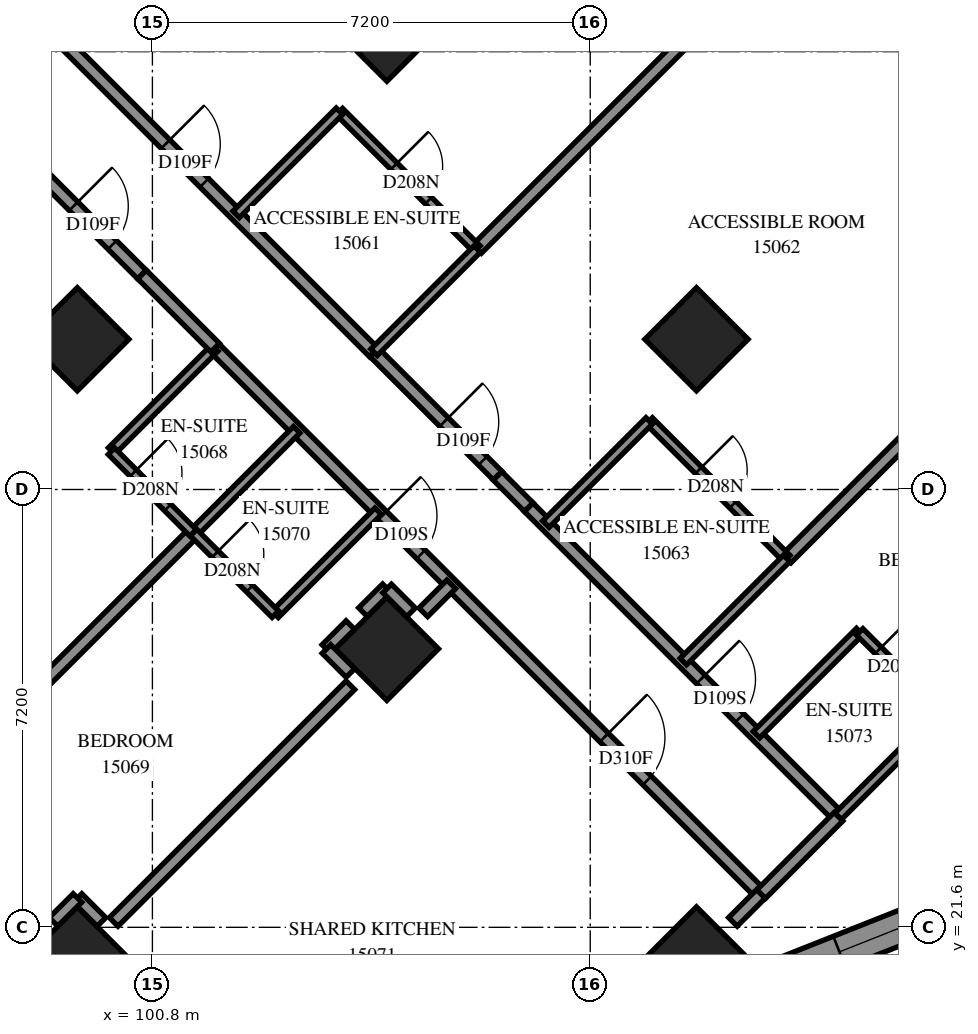
"""IFC4 building model, lengths in metres.
Left out: names, types, materials, properties, quantities, classifications, styles, units other than length and angle.
Written with IfcOpenShell. Run it as: python <this file> out.ifc"""

import sys

from ifc_helpers import new_model, si_unit, direction, frame, frame_2d, origin, origin_2d, place, context, subcontext, project, spatial, polyline, rectangle, outline, extrude, element, fill, save


model = new_model("IFC4")
c1 = context("Model", 3, precision=1e-05, world=origin(), true_north=direction((0.0, 1.0)))
c2 = subcontext(c1, "Body", "Model", "MODEL_VIEW")
j1 = project(units=[si_unit("LENGTHUNIT", "METRE"), si_unit("PLANEANGLEUNIT", "RADIAN")], contexts=[c1])
p1 = place(None, origin())
s1 = spatial("IfcSite", under=j1, at=p1, CompositionType="ELEMENT")
p2 = place(p1, origin())
s2 = spatial("IfcBuilding", under=s1, at=p2, CompositionType="ELEMENT")
p3 = place(p2, frame((0.0, 0.0, 57.6)))
s3 = spatial("IfcBuildingStorey", under=s2, at=p3, CompositionType="ELEMENT", Elevation=57.6)
for number, where, z_axis, x_axis in (
    (1, (104.656, 36.362, 0.0), (0.0, 0.0, 1.0), (0.707, -0.707, 0.0)),
    (2, (99.565, 31.271, 0.0), (0.0, 0.0, 1.0), (0.707, -0.707, 0.0)),
    (3, (109.747, 31.271, 0.0), (0.0, 0.0, 1.0), (0.707, -0.707, 0.0)),
    (4, (104.656, 26.18, 0.0), (0.0, 0.0, 1.0), (0.707, -0.707, 0.0)),
    (5, (99.565, 21.088, 0.0), (0.0, 0.0, 1.0), (0.707, -0.707, 0.0)),
    (6, (109.747, 21.088, 0.0), (0.0, 0.0, 1.0), (0.707, -0.707, 0.0)),
):
    element("IfcColumn", number, at=place(p3, frame(where, z_axis=z_axis, x_axis=x_axis)), inside=s3, PredefinedType="COLUMN", context=c2, shape_type="SweptSolid", body=[
        extrude(rectangle(XDim=1.2, YDim=1.2, at=origin_2d()), origin(), (0.0, 0.0, 1.0), 3.1),
    ])
p4 = place(p3, frame((110.959, 20.744, 0.0), z_axis=(0.0, 0.0, 1.0), x_axis=(0.929534299, 0.36873566, 0.0)))
e7 = element("IfcWall", 7, at=p4, inside=s3, PredefinedType="SOLIDWALL", context=c2, shape_type="SweptSolid", body=[
    extrude(outline(polyline([(0.119, -0.275), (5.667, -0.275), (5.418, 0.275), (-0.119, 0.275), (0.119, -0.275)])), origin(), (0.0, 0.0, 1.0), 3.1),
])
p5 = place(p4, frame((1.226, 0.0, 0.5)))
e8 = element("IfcOpeningElement", 8, at=p5, cuts=e7, PredefinedType="OPENING", context=c2, shape_type="SweptSolid", body=[
    extrude(rectangle(XDim=2.8, YDim=2.45, at=frame_2d((1.4, 1.225))), frame((0.0, 0.285, 0.0), z_axis=(0.0, -1.0, 0.0), x_axis=(1.0, 0.0, 0.0)), (0.0, 0.0, 1.0), 0.57),
])
p6 = place(p3, frame((96.645, 22.704, 0.0), z_axis=(0.0, 0.0, 1.0), x_axis=(0.5960735241, -0.8029298561, 0.0)))
e9 = element("IfcWall", 9, at=p6, inside=s3, PredefinedType="SOLIDWALL", context=c2, shape_type="SweptSolid", body=[
    extrude(outline(polyline([(0.041, -0.275), (3.951, -0.275), (3.87, 0.275), (-0.041, 0.275), (0.041, -0.275)])), origin(), (0.0, 0.0, 1.0), 3.1),
])
p7 = place(p6, frame((0.456, 0.0, 0.7)))
e10 = element("IfcOpeningElement", 10, at=p7, cuts=e9, PredefinedType="OPENING", context=c2, shape_type="SweptSolid", body=[
    extrude(rectangle(XDim=1.8, YDim=2.2, at=frame_2d((0.9, 1.1))), frame((0.0, 0.285, 0.0), z_axis=(0.0, -1.0, 0.0), x_axis=(1.0, 0.0, 0.0)), (0.0, 0.0, 1.0), 0.57),
])
p8 = place(p3, frame((101.825, 31.125, 0.0), z_axis=(0.0, 0.0, 1.0), x_axis=(0.7071067812, -0.7071067812, 0.0)))
e11 = element("IfcWall", 11, at=p8, inside=s3, PredefinedType="PARTITIONING", context=c2, shape_type="SweptSolid", body=[
    extrude(rectangle(XDim=12.7, YDim=0.2, at=frame_2d((6.35, 0.0))), origin(), (0.0, 0.0, 1.0), 3.1),
])
p9 = place(p8, frame((3.895, 0.0, 0.0)))
e12 = element("IfcOpeningElement", 12, at=p9, cuts=e11, PredefinedType="OPENING", context=c2, shape_type="SweptSolid", body=[
    extrude(rectangle(XDim=0.9, YDim=2.1, at=frame_2d((0.45, 1.05))), frame((0.0, 0.11, 0.0), z_axis=(0.0, -1.0, 0.0), x_axis=(1.0, 0.0, 0.0)), (0.0, 0.0, 1.0), 0.22),
])
p10 = place(p8, frame((9.056, 0.0, 0.0)))
e13 = element("IfcOpeningElement", 13, at=p10, cuts=e11, PredefinedType="OPENING", context=c2, shape_type="SweptSolid", body=[
    extrude(rectangle(XDim=1.0, YDim=2.1, at=frame_2d((0.5, 1.05))), frame((0.0, 0.11, 0.0), z_axis=(0.0, -1.0, 0.0), x_axis=(1.0, 0.0, 0.0)), (0.0, 0.0, 1.0), 0.22),
])
p11 = place(p3, frame((106.14, 32.756, 0.0), z_axis=(0.0, 0.0, 1.0), x_axis=(0.7071067812, 0.7071067812, 0.0)))
e14 = element("IfcWall", 14, at=p11, inside=s3, PredefinedType="PARTITIONING", context=c2, shape_type="SweptSolid", body=[
    extrude(rectangle(XDim=9.86, YDim=0.2, at=frame_2d((4.93, 0.0))), origin(), (0.0, 0.0, 1.0), 3.1),
])
p12 = place(p3, frame((99.349, 36.147, 0.0), z_axis=(0.0, 0.0, 1.0), x_axis=(0.7071067812, -0.7071067812, 0.0)))
e15 = element("IfcWall", 15, at=p12, inside=s3, PredefinedType="PARTITIONING", context=c2, shape_type="SweptSolid", body=[
    extrude(rectangle(XDim=7.201, YDim=0.2, at=frame_2d((3.601, 0.0))), origin(), (0.0, 0.0, 1.0), 3.1),
])
p13 = place(p12, frame((2.358, 0.0, 0.0)))
e16 = element("IfcOpeningElement", 16, at=p13, cuts=e15, PredefinedType="OPENING", context=c2, shape_type="SweptSolid", body=[
    extrude(rectangle(XDim=0.9, YDim=2.1, at=frame_2d((0.45, 1.05))), frame((0.0, 0.11, 0.0), z_axis=(0.0, -1.0, 0.0), x_axis=(1.0, 0.0, 0.0)), (0.0, 0.0, 1.0), 0.22),
])
p14 = place(p3, frame((106.987, 28.509, 0.0), z_axis=(0.0, 0.0, 1.0), x_axis=(0.7071067812, -0.7071067812, 0.0)))
e17 = element("IfcWall", 17, at=p14, inside=s3, PredefinedType="PARTITIONING", context=c2, shape_type="SweptSolid", body=[
    extrude(rectangle(XDim=7.198, YDim=0.2, at=frame_2d((3.599, 0.0))), origin(), (0.0, 0.0, 1.0), 3.1),
])
p15 = place(p14, frame((4.004, 0.0, 0.0)))
e18 = element("IfcOpeningElement", 18, at=p15, cuts=e17, PredefinedType="OPENING", context=c2, shape_type="SweptSolid", body=[
    extrude(rectangle(XDim=0.9, YDim=2.1, at=frame_2d((0.45, 1.05))), frame((0.0, 0.11, 0.0), z_axis=(0.0, -1.0, 0.0), x_axis=(1.0, 0.0, 0.0)), (0.0, 0.0, 1.0), 0.22),
])
p16 = place(p3, frame((96.522, 23.138, 0.0), z_axis=(0.0, 0.0, 1.0), x_axis=(0.707113922, 0.7070996403, 0.0)))
e19 = element("IfcWall", 19, at=p16, inside=s3, PredefinedType="PARTITIONING", context=c2, shape_type="SweptSolid", body=[
    extrude(rectangle(XDim=7.002, YDim=0.2, at=frame_2d((3.501, 0.0))), origin(), (0.0, 0.0, 1.0), 3.1),
])
p17 = place(p3, frame((100.163, 21.689, 0.0), z_axis=(0.0, 0.0, 1.0), x_axis=(0.7071067812, 0.7071067812, 0.0)))
e20 = element("IfcWall", 20, at=p17, inside=s3, PredefinedType="PARTITIONING", context=c2, shape_type="SweptSolid", body=[
    extrude(rectangle(XDim=5.504, YDim=0.2, at=frame_2d((2.752, 0.0))), origin(), (0.0, 0.0, 1.0), 3.1),
])
p18 = place(p3, frame((111.231, 27.665, 0.0), z_axis=(0.0, 0.0, 1.0), x_axis=(0.7071067812, 0.7071067812, 0.0)))
e21 = element("IfcWall", 21, at=p18, inside=s3, PredefinedType="PARTITIONING", context=c2, shape_type="SweptSolid", body=[
    extrude(rectangle(XDim=4.55, YDim=0.2, at=frame_2d((2.275, 0.0))), origin(), (0.0, 0.0, 1.0), 3.1),
])
p19 = place(p3, frame((98.082, 34.879, 0.0), z_axis=(0.0, 0.0, 1.0), x_axis=(0.7073845681, -0.7068288851, 0.0)))
e22 = element("IfcWall", 22, at=p19, inside=s3, PredefinedType="PARTITIONING", context=c2, shape_type="SweptSolid", body=[
    extrude(rectangle(XDim=3.599, YDim=0.2, at=frame_2d((1.8, 0.0))), origin(), (0.0, 0.0, 1.0), 3.1),
])
p20 = place(p19, frame((2.009, 0.0, 0.0)))
e23 = element("IfcOpeningElement", 23, at=p20, cuts=e22, PredefinedType="OPENING", context=c2, shape_type="SweptSolid", body=[
    extrude(rectangle(XDim=0.9, YDim=2.1, at=frame_2d((0.45, 1.05))), frame((0.0, 0.11, 0.0), z_axis=(0.0, -1.0, 0.0), x_axis=(1.0, 0.0, 0.0)), (0.0, 0.0, 1.0), 0.22),
])
p21 = place(p3, frame((108.97, 29.928, 0.0), z_axis=(0.0, 0.0, 1.0), x_axis=(0.7067942478, -0.7074191764, 0.0)))
e24 = element("IfcWall", 24, at=p21, inside=s3, PredefinedType="PARTITIONING", context=c2, shape_type="SweptSolid", body=[
    extrude(rectangle(XDim=3.2, YDim=0.15, at=frame_2d((1.6, 0.0))), origin(), (0.0, 0.0, 1.0), 3.1),
])
p22 = place(p21, frame((1.148, 0.0, 0.0)))
e25 = element("IfcOpeningElement", 25, at=p22, cuts=e24, PredefinedType="OPENING", context=c2, shape_type="SweptSolid", body=[
    extrude(rectangle(XDim=0.8, YDim=2.1, at=frame_2d((0.4, 1.05))), frame((0.0, 0.085, 0.0), z_axis=(0.0, -1.0, 0.0), x_axis=(1.0, 0.0, 0.0)), (0.0, 0.0, 1.0), 0.17),
])
p23 = place(p3, frame((103.875, 35.015, 0.0), z_axis=(0.0, 0.0, 1.0), x_axis=(0.7071067812, -0.7071067812, 0.0)))
e26 = element("IfcWall", 26, at=p23, inside=s3, PredefinedType="PARTITIONING", context=c2, shape_type="SweptSolid", body=[
    extrude(rectangle(XDim=3.199, YDim=0.15, at=frame_2d((1.599, 0.0))), origin(), (0.0, 0.0, 1.0), 3.1),
])
p24 = place(p23, frame((1.27, 0.0, 0.0)))
e27 = element("IfcOpeningElement", 27, at=p24, cuts=e26, PredefinedType="OPENING", context=c2, shape_type="SweptSolid", body=[
    extrude(rectangle(XDim=0.8, YDim=2.1, at=frame_2d((0.4, 1.05))), frame((0.0, 0.085, 0.0), z_axis=(0.0, -1.0, 0.0), x_axis=(1.0, 0.0, 0.0)), (0.0, 0.0, 1.0), 0.17),
])
p25 = place(p3, frame((104.445, 31.059, 0.0), z_axis=(0.0, 0.0, 1.0), x_axis=(0.7074545101, -0.7067588812, 0.0)))
e28 = element("IfcWall", 28, at=p25, inside=s3, PredefinedType="PARTITIONING", context=c2, shape_type="SweptSolid", body=[
    extrude(rectangle(XDim=2.875, YDim=0.2, at=frame_2d((1.438, 0.0))), origin(), (0.0, 0.0, 1.0), 3.1),
])
p26 = place(p25, frame((1.626, 0.0, 0.0)))
e29 = element("IfcOpeningElement", 29, at=p26, cuts=e28, PredefinedType="OPENING", context=c2, shape_type="SweptSolid", body=[
    extrude(rectangle(XDim=0.9, YDim=2.1, at=frame_2d((0.45, 1.05))), frame((0.0, 0.11, 0.0), z_axis=(0.0, -1.0, 0.0), x_axis=(1.0, 0.0, 0.0)), (0.0, 0.0, 1.0), 0.22),
])
for number, where, z_axis, x_axis in (
    (30, (107.271, 28.231, 0.0), (0.0, 0.0, 1.0), (0.707, 0.707, 0.0)),
    (31, (100.129, 29.433, 0.0), (0.0, 0.0, 1.0), (0.707, 0.707, 0.0)),
):
    element("IfcWall", number, at=place(p3, frame(where, z_axis=z_axis, x_axis=x_axis)), inside=s3, PredefinedType="PARTITIONING", context=c2, shape_type="SweptSolid", body=[
        extrude(rectangle(XDim=2.401, YDim=0.15, at=frame_2d((1.201, 0.0))), origin(), (0.0, 0.0, 1.0), 3.1),
    ])
p27 = place(p3, frame((104.445, 31.057, 0.0), z_axis=(0.0, 0.0, 1.0), x_axis=(0.706689978, 0.7075233388, 0.0)))
e32 = element("IfcWall", 32, at=p27, inside=s3, PredefinedType="PARTITIONING", context=c2, shape_type="SweptSolid", body=[
    extrude(rectangle(XDim=2.4, YDim=0.15, at=frame_2d((1.2, 0.0))), origin(), (0.0, 0.0, 1.0), 3.1),
])
p28 = place(p3, frame((112.077, 23.425, 0.0), z_axis=(0.0, 0.0, 1.0), x_axis=(0.7075233388, 0.706689978, 0.0)))
e33 = element("IfcWall", 33, at=p28, inside=s3, PredefinedType="PARTITIONING", context=c2, shape_type="SweptSolid", body=[
    extrude(rectangle(XDim=2.4, YDim=0.15, at=frame_2d((1.2, 0.0))), origin(), (0.0, 0.0, 1.0), 2.6),
])
for number, where, z_axis, x_axis in (
    (34, (101.477, 28.085, 0.0), (0.0, 0.0, 1.0), (0.707, 0.708, 0.0)),
    (35, (102.177, 33.325, 0.0), (0.0, 0.0, 1.0), (0.708, 0.707, 0.0)),
    (36, (109.531, 25.971, 0.0), (0.0, 0.0, 1.0), (0.708, 0.707, 0.0)),
    (37, (110.734, 24.768, 0.0), (0.0, 0.0, 1.0), (0.708, 0.707, 0.0)),
):
    element("IfcWall", number, at=place(p3, frame(where, z_axis=z_axis, x_axis=x_axis)), inside=s3, PredefinedType="PARTITIONING", context=c2, shape_type="SweptSolid", body=[
        extrude(rectangle(XDim=2.4, YDim=0.15, at=frame_2d((1.2, 0.0))), origin(), (0.0, 0.0, 1.0), 3.1),
    ])
p29 = place(p3, frame((102.817, 26.747, 0.0), z_axis=(0.0, 0.0, 1.0), x_axis=(0.7071067812, 0.7071067812, 0.0)))
e38 = element("IfcWall", 38, at=p29, inside=s3, PredefinedType="PARTITIONING", context=c2, shape_type="SweptSolid", body=[
    extrude(rectangle(XDim=2.398, YDim=0.15, at=frame_2d((1.199, 0.0))), origin(), (0.0, 0.0, 1.0), 3.1),
])
p30 = place(p3, frame((100.127, 29.429, 0.0), z_axis=(0.0, 0.0, 1.0), x_axis=(0.7071067812, -0.7071067812, 0.0)))
e39 = element("IfcWall", 39, at=p30, inside=s3, PredefinedType="PARTITIONING", context=c2, shape_type="SweptSolid", body=[
    extrude(rectangle(XDim=1.901, YDim=0.15, at=frame_2d((0.95, 0.0))), origin(), (0.0, 0.0, 1.0), 3.1),
])
p31 = place(p30, frame((0.508, 0.0, 0.0)))
e40 = element("IfcOpeningElement", 40, at=p31, cuts=e39, PredefinedType="OPENING", context=c2, shape_type="SweptSolid", body=[
    extrude(rectangle(XDim=0.8, YDim=2.1, at=frame_2d((0.4, 1.05))), frame((0.0, 0.085, 0.0), z_axis=(0.0, -1.0, 0.0), x_axis=(1.0, 0.0, 0.0)), (0.0, 0.0, 1.0), 0.17),
])
p32 = place(p3, frame((112.431, 26.459, 0.0), z_axis=(0.0, 0.0, 1.0), x_axis=(0.7071067812, -0.7071067812, 0.0)))
e41 = element("IfcWall", 41, at=p32, inside=s3, PredefinedType="PARTITIONING", context=c2, shape_type="SweptSolid", body=[
    extrude(rectangle(XDim=1.901, YDim=0.15, at=frame_2d((0.95, 0.0))), origin(), (0.0, 0.0, 1.0), 3.1),
])
p33 = place(p32, frame((0.431, 0.0, 0.0)))
e42 = element("IfcOpeningElement", 42, at=p33, cuts=e41, PredefinedType="OPENING", context=c2, shape_type="SweptSolid", body=[
    extrude(rectangle(XDim=0.8, YDim=2.1, at=frame_2d((0.4, 1.05))), frame((0.0, 0.085, 0.0), z_axis=(0.0, -1.0, 0.0), x_axis=(1.0, 0.0, 0.0)), (0.0, 0.0, 1.0), 0.17),
])
p34 = place(p3, frame((101.477, 28.091, 0.0), z_axis=(0.0, 0.0, 1.0), x_axis=(0.7076330979, -0.7065800724, 0.0)))
e43 = element("IfcWall", 43, at=p34, inside=s3, PredefinedType="PARTITIONING", context=c2, shape_type="SweptSolid", body=[
    extrude(rectangle(XDim=1.899, YDim=0.15, at=frame_2d((0.95, 0.0))), origin(), (0.0, 0.0, 1.0), 3.1),
])
p35 = place(p34, frame((0.501, 0.0, 0.0)))
e44 = element("IfcOpeningElement", 44, at=p35, cuts=e43, PredefinedType="OPENING", context=c2, shape_type="SweptSolid", body=[
    extrude(rectangle(XDim=0.8, YDim=2.1, at=frame_2d((0.4, 1.05))), frame((0.0, 0.085, 0.0), z_axis=(0.0, -1.0, 0.0), x_axis=(1.0, 0.0, 0.0)), (0.0, 0.0, 1.0), 0.17),
])
p36 = place(p3, frame((110.811, 22.145, 0.0), z_axis=(0.0, 0.0, 1.0), x_axis=(0.7065510983, 0.7076620277, 0.0)))
e45 = element("IfcWall", 45, at=p36, inside=s3, PredefinedType="PARTITIONING", context=c2, shape_type="SweptSolid", body=[
    extrude(rectangle(XDim=1.8, YDim=0.2, at=frame_2d((0.9, 0.0))), origin(), (0.0, 0.0, 1.0), 2.6),
])
p37 = place(p3, frame((100.629, 32.335, 0.0), z_axis=(0.0, 0.0, 1.0), x_axis=(0.7071067812, -0.7071067812, 0.0)))
e46 = element("IfcWall", 46, at=p37, inside=s3, PredefinedType="PARTITIONING", context=c2, shape_type="SweptSolid", body=[
    extrude(rectangle(XDim=1.7, YDim=0.2, at=frame_2d((0.85, 0.0))), origin(), (0.0, 0.0, 1.0), 3.1),
])
p38 = place(p3, frame((106.476, 29.024, 0.0), z_axis=(0.0, 0.0, 1.0), x_axis=(0.7057270646, -0.7084838109, 0.0)))
e47 = element("IfcWall", 47, at=p38, inside=s3, PredefinedType="PARTITIONING", context=c2, shape_type="SweptSolid", body=[
    extrude(rectangle(XDim=0.726, YDim=0.2, at=frame_2d((0.363, 0.0))), origin(), (0.0, 0.0, 1.0), 3.1),
])
p39 = place(p3, frame((110.347, 21.689, 0.0), z_axis=(0.0, 0.0, 1.0), x_axis=(0.7071067812, 0.7071067812, 0.0)))
e48 = element("IfcWall", 48, at=p39, inside=s3, PredefinedType="PARTITIONING", context=c2, shape_type="SweptSolid", body=[
    extrude(rectangle(XDim=0.65, YDim=0.2, at=frame_2d((0.325, 0.0))), origin(), (0.0, 0.0, 1.0), 2.6),
])
p40 = place(p3, frame((105.255, 26.781, 0.0), z_axis=(0.0, 0.0, 1.0), x_axis=(0.7071067812, 0.7071067812, 0.0)))
e49 = element("IfcWall", 49, at=p40, inside=s3, PredefinedType="PARTITIONING", context=c2, shape_type="SweptSolid", body=[
    extrude(rectangle(XDim=0.65, YDim=0.2, at=frame_2d((0.325, 0.0))), origin(), (0.0, 0.0, 1.0), 3.1),
])
for number, where, z_axis, x_axis in (
    (50, (99.568, 22.082, 0.0), (0.0, 0.0, 1.0), (0.707, -0.707, 0.0)),
    (51, (99.173, 21.689, 0.0), (0.0, 0.0, 1.0), (0.707, 0.707, 0.0)),
    (52, (103.661, 26.177, 0.0), (0.0, 0.0, 1.0), (0.707, 0.707, 0.0)),
    (53, (103.662, 26.177, 0.0), (0.0, 0.0, 1.0), (0.707, -0.707, 0.0)),
):
    element("IfcWall", number, at=place(p3, frame(where, z_axis=z_axis, x_axis=x_axis)), inside=s3, PredefinedType="PARTITIONING", context=c2, shape_type="SweptSolid", body=[
        extrude(rectangle(XDim=0.557, YDim=0.2, at=frame_2d((0.279, 0.0))), origin(), (0.0, 0.0, 1.0), 3.1),
    ])
p41 = place(p3, frame((104.263, 26.784, 0.0), z_axis=(0.0, 0.0, 1.0), x_axis=(0.7089037401, 0.705305244, 0.0)))
e54 = element("IfcWall", 54, at=p41, inside=s3, PredefinedType="PARTITIONING", context=c2, shape_type="SweptSolid", body=[
    extrude(rectangle(XDim=0.556, YDim=0.2, at=frame_2d((0.278, 0.0))), origin(), (0.0, 0.0, 1.0), 3.1),
])
p42 = place(p3, frame((104.66, 27.172, 0.0), z_axis=(0.0, 0.0, 1.0), x_axis=(0.7071067812, -0.7071067812, 0.0)))
e55 = element("IfcWall", 55, at=p42, inside=s3, PredefinedType="PARTITIONING", context=c2, shape_type="SweptSolid", body=[
    extrude(rectangle(XDim=0.554, YDim=0.2, at=frame_2d((0.277, 0.0))), origin(), (0.0, 0.0, 1.0), 3.1),
])
p43 = place(p5, origin())
e56 = element("IfcWindow", 56, at=p43, inside=s3, PartitioningType="SINGLE_PANEL", PredefinedType="WINDOW", context=c2, shape_type="SweptSolid", body=[
    extrude(rectangle(XDim=2.8, YDim=2.45, at=frame_2d((1.4, 1.225))), frame((0.0, 0.155, 0.0), z_axis=(0.0, -1.0, 0.0), x_axis=(1.0, 0.0, 0.0)), (0.0, 0.0, 1.0), 0.06),
])
fill(e8, e56)
p44 = place(p13, origin())
e57 = element("IfcDoor", 57, at=p44, inside=s3, OperationType="SINGLE_SWING_RIGHT", PredefinedType="DOOR", context=c2, shape_type="SweptSolid", body=[
    extrude(rectangle(XDim=0.9, YDim=2.1, at=frame_2d((0.45, 1.05))), frame((0.0, 0.025, 0.0), z_axis=(0.0, -1.0, 0.0), x_axis=(1.0, 0.0, 0.0)), (0.0, 0.0, 1.0), 0.05),
])
fill(e16, e57)
p45 = place(p24, origin())
e58 = element("IfcDoor", 58, at=p45, inside=s3, OperationType="SINGLE_SWING_RIGHT", PredefinedType="DOOR", context=c2, shape_type="SweptSolid", body=[
    extrude(rectangle(XDim=0.8, YDim=2.1, at=frame_2d((0.4, 1.05))), frame((0.0, 0.025, 0.0), z_axis=(0.0, -1.0, 0.0), x_axis=(1.0, 0.0, 0.0)), (0.0, 0.0, 1.0), 0.05),
])
fill(e27, e58)
p46 = place(p26, origin())
e59 = element("IfcDoor", 59, at=p46, inside=s3, OperationType="SINGLE_SWING_RIGHT", PredefinedType="DOOR", context=c2, shape_type="SweptSolid", body=[
    extrude(rectangle(XDim=0.9, YDim=2.1, at=frame_2d((0.45, 1.05))), frame((0.0, 0.025, 0.0), z_axis=(0.0, -1.0, 0.0), x_axis=(1.0, 0.0, 0.0)), (0.0, 0.0, 1.0), 0.05),
])
fill(e29, e59)
p47 = place(p22, origin())
e60 = element("IfcDoor", 60, at=p47, inside=s3, OperationType="SINGLE_SWING_RIGHT", PredefinedType="DOOR", context=c2, shape_type="SweptSolid", body=[
    extrude(rectangle(XDim=0.8, YDim=2.1, at=frame_2d((0.4, 1.05))), frame((0.0, 0.025, 0.0), z_axis=(0.0, -1.0, 0.0), x_axis=(1.0, 0.0, 0.0)), (0.0, 0.0, 1.0), 0.05),
])
fill(e25, e60)
p48 = place(p20, origin())
e61 = element("IfcDoor", 61, at=p48, inside=s3, OperationType="SINGLE_SWING_LEFT", PredefinedType="DOOR", context=c2, shape_type="SweptSolid", body=[
    extrude(rectangle(XDim=0.9, YDim=2.1, at=frame_2d((0.45, 1.05))), frame((0.0, 0.025, 0.0), z_axis=(0.0, -1.0, 0.0), x_axis=(1.0, 0.0, 0.0)), (0.0, 0.0, 1.0), 0.05),
])
fill(e23, e61)
p49 = place(p31, origin())
e62 = element("IfcDoor", 62, at=p49, inside=s3, OperationType="SINGLE_SWING_RIGHT", PredefinedType="DOOR", context=c2, shape_type="SweptSolid", body=[
    extrude(rectangle(XDim=0.8, YDim=2.1, at=frame_2d((0.4, 1.05))), frame((0.0, 0.025, 0.0), z_axis=(0.0, -1.0, 0.0), x_axis=(1.0, 0.0, 0.0)), (0.0, 0.0, 1.0), 0.05),
])
fill(e40, e62)
p50 = place(p9, origin())
e63 = element("IfcDoor", 63, at=p50, inside=s3, OperationType="SINGLE_SWING_LEFT", PredefinedType="DOOR", context=c2, shape_type="SweptSolid", body=[
    extrude(rectangle(XDim=0.9, YDim=2.1, at=frame_2d((0.45, 1.05))), frame((0.0, 0.025, 0.0), z_axis=(0.0, -1.0, 0.0), x_axis=(1.0, 0.0, 0.0)), (0.0, 0.0, 1.0), 0.05),
])
fill(e12, e63)
p51 = place(p35, origin())
e64 = element("IfcDoor", 64, at=p51, inside=s3, OperationType="SINGLE_SWING_RIGHT", PredefinedType="DOOR", context=c2, shape_type="SweptSolid", body=[
    extrude(rectangle(XDim=0.8, YDim=2.1, at=frame_2d((0.4, 1.05))), frame((0.0, 0.025, 0.0), z_axis=(0.0, -1.0, 0.0), x_axis=(1.0, 0.0, 0.0)), (0.0, 0.0, 1.0), 0.05),
])
fill(e44, e64)
p52 = place(p10, origin())
e65 = element("IfcDoor", 65, at=p52, inside=s3, OperationType="SINGLE_SWING_RIGHT", PredefinedType="DOOR", context=c2, shape_type="SweptSolid", body=[
    extrude(rectangle(XDim=1.0, YDim=2.1, at=frame_2d((0.5, 1.05))), frame((0.0, 0.025, 0.0), z_axis=(0.0, -1.0, 0.0), x_axis=(1.0, 0.0, 0.0)), (0.0, 0.0, 1.0), 0.05),
])
fill(e13, e65)
p53 = place(p15, origin())
e66 = element("IfcDoor", 66, at=p53, inside=s3, OperationType="SINGLE_SWING_RIGHT", PredefinedType="DOOR", context=c2, shape_type="SweptSolid", body=[
    extrude(rectangle(XDim=0.9, YDim=2.1, at=frame_2d((0.45, 1.05))), frame((0.0, 0.025, 0.0), z_axis=(0.0, -1.0, 0.0), x_axis=(1.0, 0.0, 0.0)), (0.0, 0.0, 1.0), 0.05),
])
fill(e18, e66)
p54 = place(p33, origin())
e67 = element("IfcDoor", 67, at=p54, inside=s3, OperationType="SINGLE_SWING_RIGHT", PredefinedType="DOOR", context=c2, shape_type="SweptSolid", body=[
    extrude(rectangle(XDim=0.8, YDim=2.1, at=frame_2d((0.4, 1.05))), frame((0.0, 0.025, 0.0), z_axis=(0.0, -1.0, 0.0), x_axis=(1.0, 0.0, 0.0)), (0.0, 0.0, 1.0), 0.05),
])
fill(e42, e67)
save(model, sys.argv[1])
